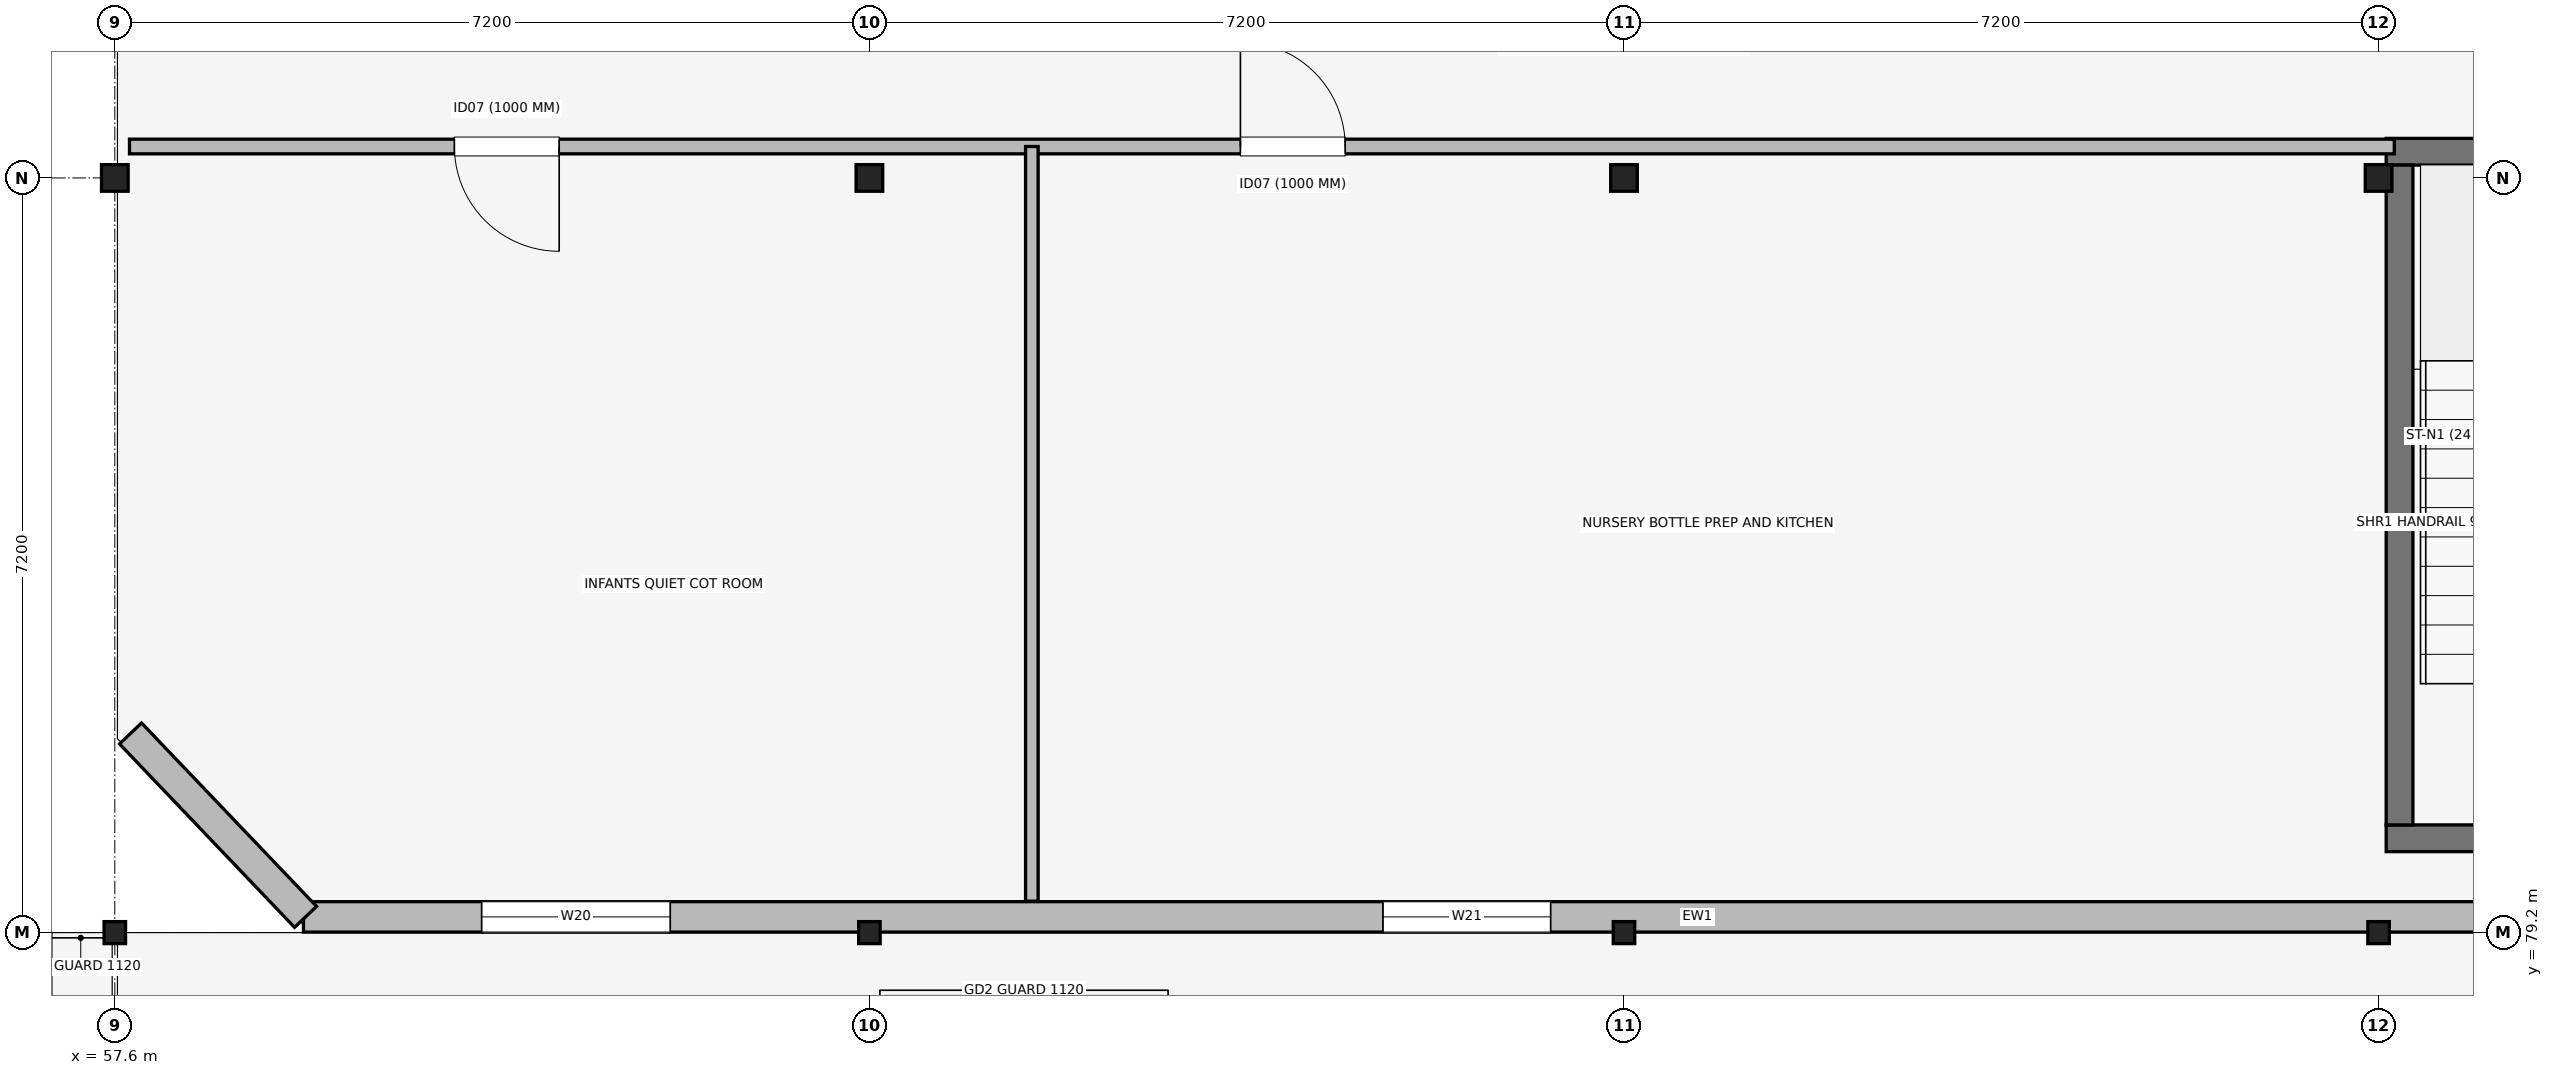
"""IFC4 building model, lengths in metres.
Left out: names, types, materials, properties, quantities, classifications, styles, units other than length and angle.
Written with IfcOpenShell. Run it as: python <this file> out.ifc"""

import sys

from ifc_helpers import new_model, si_unit, direction, frame, frame_2d, origin, origin_2d, place, context, subcontext, project, spatial, rectangle, i_section, extrude, element, fill, save


model = new_model("IFC4")
c1 = context("Model", 3, precision=1e-05, world=origin(), true_north=direction((0.0, 1.0)))
c2 = subcontext(c1, "Body", "Model", "MODEL_VIEW")
j1 = project(units=[si_unit("LENGTHUNIT", "METRE"), si_unit("PLANEANGLEUNIT", "RADIAN")], contexts=[c1])
p1 = place(None, origin())
s1 = spatial("IfcSite", under=j1, at=p1, CompositionType="ELEMENT")
p2 = place(p1, origin())
s2 = spatial("IfcBuilding", under=s1, at=p2, CompositionType="ELEMENT")
p3 = place(p2, frame((0.0, 0.0, 4.5)))
s3 = spatial("IfcBuildingStorey", under=s2, at=p3, CompositionType="ELEMENT", Elevation=4.5)
p4 = place(p3, frame((57.6, 79.2, 0.0), z_axis=(0.0, 0.0, 1.0), x_axis=(1.0, 0.0, 0.0)))
e1 = element("IfcColumn", 1, at=p4, inside=s3, PredefinedType="COLUMN", context=c2, shape_type="SweptSolid", body=[
    extrude(i_section(OverallWidth=0.205, OverallDepth=0.21, WebThickness=0.009, FlangeThickness=0.014, FilletRadius=0.01, at=origin_2d()), origin(), (0.0, 0.0, 1.0), 4.2),
])
p5 = place(p3, frame((57.6, 86.4, 0.0), z_axis=(0.0, 0.0, 1.0), x_axis=(1.0, 0.0, 0.0)))
e2 = element("IfcColumn", 2, at=p5, inside=s3, PredefinedType="COLUMN", context=c2, shape_type="SweptSolid", body=[
    extrude(i_section(OverallWidth=0.254, OverallDepth=0.254, WebThickness=0.009, FlangeThickness=0.014, FilletRadius=0.013, at=origin_2d()), origin(), (0.0, 0.0, 1.0), 4.2),
])
p6 = place(p3, frame((64.8, 79.2, 0.0), z_axis=(0.0, 0.0, 1.0), x_axis=(1.0, 0.0, 0.0)))
e3 = element("IfcColumn", 3, at=p6, inside=s3, PredefinedType="COLUMN", context=c2, shape_type="SweptSolid", body=[
    extrude(i_section(OverallWidth=0.205, OverallDepth=0.21, WebThickness=0.009, FlangeThickness=0.014, FilletRadius=0.01, at=origin_2d()), origin(), (0.0, 0.0, 1.0), 4.2),
])
p7 = place(p3, frame((64.8, 86.4, 0.0), z_axis=(0.0, 0.0, 1.0), x_axis=(1.0, 0.0, 0.0)))
e4 = element("IfcColumn", 4, at=p7, inside=s3, PredefinedType="COLUMN", context=c2, shape_type="SweptSolid", body=[
    extrude(i_section(OverallWidth=0.254, OverallDepth=0.254, WebThickness=0.009, FlangeThickness=0.014, FilletRadius=0.013, at=origin_2d()), origin(), (0.0, 0.0, 1.0), 4.2),
])
p8 = place(p3, frame((72.0, 79.2, 0.0), z_axis=(0.0, 0.0, 1.0), x_axis=(1.0, 0.0, 0.0)))
e5 = element("IfcColumn", 5, at=p8, inside=s3, PredefinedType="COLUMN", context=c2, shape_type="SweptSolid", body=[
    extrude(i_section(OverallWidth=0.205, OverallDepth=0.21, WebThickness=0.009, FlangeThickness=0.014, FilletRadius=0.01, at=origin_2d()), origin(), (0.0, 0.0, 1.0), 4.2),
])
p9 = place(p3, frame((72.0, 86.4, 0.0), z_axis=(0.0, 0.0, 1.0), x_axis=(1.0, 0.0, 0.0)))
e6 = element("IfcColumn", 6, at=p9, inside=s3, PredefinedType="COLUMN", context=c2, shape_type="SweptSolid", body=[
    extrude(i_section(OverallWidth=0.254, OverallDepth=0.254, WebThickness=0.009, FlangeThickness=0.014, FilletRadius=0.013, at=origin_2d()), origin(), (0.0, 0.0, 1.0), 4.2),
])
p10 = place(p3, frame((79.2, 79.2, 0.0), z_axis=(0.0, 0.0, 1.0), x_axis=(1.0, 0.0, 0.0)))
e7 = element("IfcColumn", 7, at=p10, inside=s3, PredefinedType="COLUMN", context=c2, shape_type="SweptSolid", body=[
    extrude(i_section(OverallWidth=0.205, OverallDepth=0.21, WebThickness=0.009, FlangeThickness=0.014, FilletRadius=0.01, at=origin_2d()), origin(), (0.0, 0.0, 1.0), 4.2),
])
p11 = place(p3, frame((79.2, 86.4, 0.0), z_axis=(0.0, 0.0, 1.0), x_axis=(1.0, 0.0, 0.0)))
e8 = element("IfcColumn", 8, at=p11, inside=s3, PredefinedType="COLUMN", context=c2, shape_type="SweptSolid", body=[
    extrude(i_section(OverallWidth=0.254, OverallDepth=0.254, WebThickness=0.009, FlangeThickness=0.014, FilletRadius=0.013, at=origin_2d()), origin(), (0.0, 0.0, 1.0), 4.2),
])
for number, where, z_axis, x_axis in (
    (9, (79.272, 80.1, 0.0), (0.0, 0.0, 1.0), (1.0, 0.0, 0.0)),
    (10, (79.272, 86.65, 0.0), (0.0, 0.0, 1.0), (1.0, 0.0, 0.0)),
):
    element("IfcWall", number, at=place(p3, frame(where, z_axis=z_axis, x_axis=x_axis)), inside=s3, PredefinedType="SHEAR", context=c2, shape_type="SweptSolid", body=[
        extrude(rectangle(XDim=3.305, YDim=0.255, at=frame_2d((1.652, 0.0))), origin(), (0.0, 0.0, 1.0), 4.2),
    ])
p12 = place(p3, frame((79.4, 80.228, 0.0), z_axis=(0.0, 0.0, 1.0), x_axis=(0.0, 1.0, 0.0)))
e11 = element("IfcWall", 11, at=p12, inside=s3, PredefinedType="SHEAR", context=c2, shape_type="SweptSolid", body=[
    extrude(rectangle(XDim=6.295, YDim=0.255, at=frame_2d((3.147, 0.0))), origin(), (0.0, 0.0, 1.0), 4.2),
])
p13 = place(p3, frame((59.4, 79.35, 0.0), z_axis=(0.0, 0.0, 1.0), x_axis=(1.0, 0.0, 0.0)))
e12 = element("IfcWall", 12, at=p13, inside=s3, PredefinedType="SOLIDWALL", context=c2, shape_type="SweptSolid", body=[
    extrude(rectangle(XDim=46.8, YDim=0.29, at=frame_2d((23.4, 0.0))), origin(), (0.0, 0.0, 1.0), 3.448),
])
p14 = place(p13, frame((25.75, 0.0, 0.0), z_axis=(0.0, 0.0, 1.0), x_axis=(-1.0, 0.0, 0.0)))
e13 = element("IfcOpeningElement", 13, at=p14, cuts=e12, PredefinedType="OPENING", context=c2, shape_type="SweptSolid", body=[
    extrude(rectangle(XDim=1.5, YDim=2.35, at=frame_2d((0.75, 1.175))), frame((0.0, 0.155, 0.0), z_axis=(0.0, -1.0, 0.0), x_axis=(1.0, 0.0, 0.0)), (0.0, 0.0, 1.0), 0.31),
])
p15 = place(p13, frame((44.8, 0.0, 0.0), z_axis=(0.0, 0.0, 1.0), x_axis=(-1.0, 0.0, 0.0)))
e14 = element("IfcOpeningElement", 14, at=p15, cuts=e12, PredefinedType="OPENING", context=c2, shape_type="SweptSolid", body=[
    extrude(rectangle(XDim=1.2, YDim=2.2, at=frame_2d((0.6, 1.1))), frame((0.0, 0.155, 0.0), z_axis=(0.0, -1.0, 0.0), x_axis=(1.0, 0.0, 0.0)), (0.0, 0.0, 1.0), 0.31),
])
p16 = place(p13, frame((1.7, 0.0, 1.1)))
e15 = element("IfcOpeningElement", 15, at=p16, cuts=e12, PredefinedType="OPENING", context=c2, shape_type="SweptSolid", body=[
    extrude(rectangle(XDim=1.8, YDim=1.2, at=frame_2d((0.9, 0.6))), frame((0.0, 0.155, 0.0), z_axis=(0.0, -1.0, 0.0), x_axis=(1.0, 0.0, 0.0)), (0.0, 0.0, 1.0), 0.31),
])
p17 = place(p13, frame((10.3, 0.0, 0.75)))
e16 = element("IfcOpeningElement", 16, at=p17, cuts=e12, PredefinedType="OPENING", context=c2, shape_type="SweptSolid", body=[
    extrude(rectangle(XDim=1.6, YDim=2.0, at=frame_2d((0.8, 1.0))), frame((0.0, 0.155, 0.0), z_axis=(0.0, -1.0, 0.0), x_axis=(1.0, 0.0, 0.0)), (0.0, 0.0, 1.0), 0.31),
])
p18 = place(p13, frame((29.8, 0.0, 0.75)))
e17 = element("IfcOpeningElement", 17, at=p18, cuts=e12, PredefinedType="OPENING", context=c2, shape_type="SweptSolid", body=[
    extrude(rectangle(XDim=1.6, YDim=2.0, at=frame_2d((0.8, 1.0))), frame((0.0, 0.155, 0.0), z_axis=(0.0, -1.0, 0.0), x_axis=(1.0, 0.0, 0.0)), (0.0, 0.0, 1.0), 0.31),
])
p19 = place(p13, frame((37.0, 0.0, 0.75)))
e18 = element("IfcOpeningElement", 18, at=p19, cuts=e12, PredefinedType="OPENING", context=c2, shape_type="SweptSolid", body=[
    extrude(rectangle(XDim=1.6, YDim=2.0, at=frame_2d((0.8, 1.0))), frame((0.0, 0.155, 0.0), z_axis=(0.0, -1.0, 0.0), x_axis=(1.0, 0.0, 0.0)), (0.0, 0.0, 1.0), 0.31),
])
p20 = place(p3, frame((59.42, 79.35, 0.0), z_axis=(0.0, 0.0, 1.0), x_axis=(-0.690360514167, 0.723465521279, 0.0)))
e19 = element("IfcWall", 19, at=p20, inside=s3, PredefinedType="SOLIDWALL", context=c2, shape_type="SweptSolid", body=[
    extrude(rectangle(XDim=2.419, YDim=0.29, at=frame_2d((1.209, 0.0))), origin(), (0.0, 0.0, 1.0), 3.448),
])
p21 = place(p3, frame((57.74, 86.7, 0.0), z_axis=(0.0, 0.0, 1.0), x_axis=(1.0, 0.0, 0.0)))
e20 = element("IfcWall", 20, at=p21, inside=s3, PredefinedType="PARTITIONING", context=c2, shape_type="SweptSolid", body=[
    extrude(rectangle(XDim=21.61, YDim=0.14, at=frame_2d((10.805, 0.0))), origin(), (0.0, 0.0, 1.0), 3.2),
])
p22 = place(p21, frame((4.1, 0.0, 0.0), z_axis=(0.0, 0.0, 1.0), x_axis=(-1.0, 0.0, 0.0)))
e21 = element("IfcOpeningElement", 21, at=p22, cuts=e20, PredefinedType="OPENING", context=c2, shape_type="SweptSolid", body=[
    extrude(rectangle(XDim=1.0, YDim=2.12, at=frame_2d((0.5, 1.06))), frame((0.0, 0.08, 0.0), z_axis=(0.0, -1.0, 0.0), x_axis=(1.0, 0.0, 0.0)), (0.0, 0.0, 1.0), 0.16),
])
p23 = place(p21, frame((10.6, 0.0, 0.0)))
e22 = element("IfcOpeningElement", 22, at=p23, cuts=e20, PredefinedType="OPENING", context=c2, shape_type="SweptSolid", body=[
    extrude(rectangle(XDim=1.0, YDim=2.12, at=frame_2d((0.5, 1.06))), frame((0.0, 0.08, 0.0), z_axis=(0.0, -1.0, 0.0), x_axis=(1.0, 0.0, 0.0)), (0.0, 0.0, 1.0), 0.16),
])
p24 = place(p3, frame((66.35, 79.5, 0.0), z_axis=(0.0, 0.0, 1.0), x_axis=(0.0, 1.0, 0.0)))
e23 = element("IfcWall", 23, at=p24, inside=s3, PredefinedType="PARTITIONING", context=c2, shape_type="SweptSolid", body=[
    extrude(rectangle(XDim=7.2, YDim=0.12, at=frame_2d((3.6, 0.0))), origin(), (0.0, 0.0, 1.0), 3.2),
])
p25 = place(p16, origin())
e24 = element("IfcWindow", 24, at=p25, inside=s3, PartitioningType="SINGLE_PANEL", PredefinedType="WINDOW", context=c2, shape_type="SweptSolid", body=[
    extrude(rectangle(XDim=1.8, YDim=1.2, at=frame_2d((0.9, 0.6))), frame((0.0, 0.03, 0.0), z_axis=(0.0, -1.0, 0.0), x_axis=(1.0, 0.0, 0.0)), (0.0, 0.0, 1.0), 0.06),
])
fill(e15, e24)
p26 = place(p17, origin())
e25 = element("IfcWindow", 25, at=p26, inside=s3, PartitioningType="SINGLE_PANEL", PredefinedType="WINDOW", context=c2, shape_type="SweptSolid", body=[
    extrude(rectangle(XDim=1.6, YDim=2.0, at=frame_2d((0.8, 1.0))), frame((0.0, 0.03, 0.0), z_axis=(0.0, -1.0, 0.0), x_axis=(1.0, 0.0, 0.0)), (0.0, 0.0, 1.0), 0.06),
])
fill(e16, e25)
p27 = place(p22, origin())
e26 = element("IfcDoor", 26, at=p27, inside=s3, OperationType="SINGLE_SWING_RIGHT", PredefinedType="DOOR", context=c2, shape_type="SweptSolid", body=[
    extrude(rectangle(XDim=1.0, YDim=2.12, at=frame_2d((0.5, 1.06))), frame((0.0, 0.025, 0.0), z_axis=(0.0, -1.0, 0.0), x_axis=(1.0, 0.0, 0.0)), (0.0, 0.0, 1.0), 0.05),
])
fill(e21, e26)
p28 = place(p23, origin())
e27 = element("IfcDoor", 27, at=p28, inside=s3, OperationType="SINGLE_SWING_LEFT", PredefinedType="DOOR", context=c2, shape_type="SweptSolid", body=[
    extrude(rectangle(XDim=1.0, YDim=2.12, at=frame_2d((0.5, 1.06))), frame((0.0, 0.025, 0.0), z_axis=(0.0, -1.0, 0.0), x_axis=(1.0, 0.0, 0.0)), (0.0, 0.0, 1.0), 0.05),
])
fill(e22, e27)
save(model, sys.argv[1])
